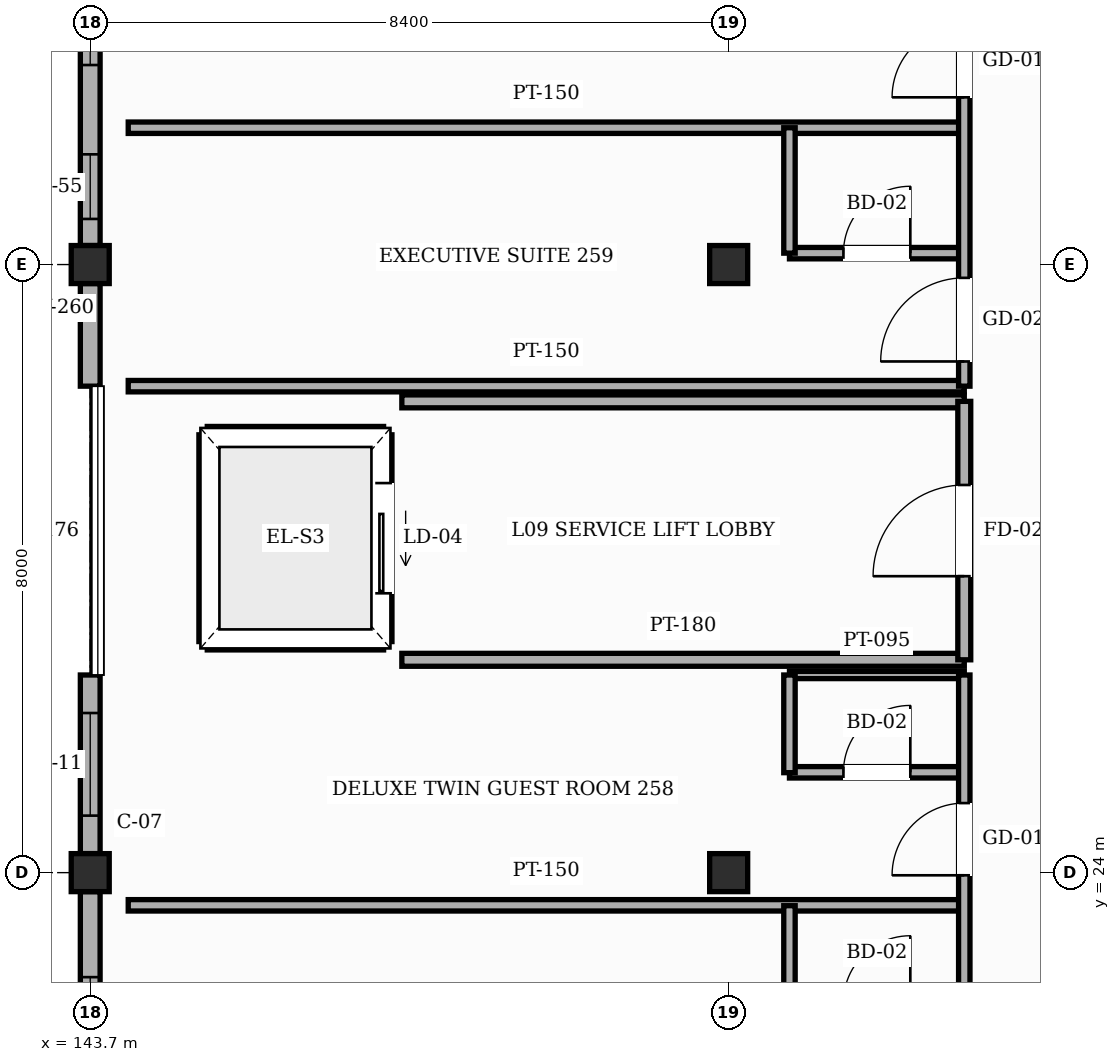
"""IFC4 building model, lengths in metres.
Left out: names, types, materials, properties, quantities, classifications, styles, units other than length and angle.
Written with IfcOpenShell. Run it as: python <this file> out.ifc"""

import sys

from ifc_helpers import new_model, si_unit, direction, frame, frame_2d, origin, origin_2d, place, context, subcontext, project, spatial, rectangle, hollow_rectangle, extrude, element, fill, save


model = new_model("IFC4")
c1 = context("Model", 3, precision=1e-05, world=origin(), true_north=direction((0.0, 1.0)))
c2 = subcontext(c1, "Body", "Model", "MODEL_VIEW")
j1 = project(units=[si_unit("LENGTHUNIT", "METRE"), si_unit("PLANEANGLEUNIT", "RADIAN")], contexts=[c1])
p1 = place(None, origin())
s1 = spatial("IfcSite", under=j1, at=p1, CompositionType="ELEMENT")
p2 = place(p1, origin())
s2 = spatial("IfcBuilding", under=s1, at=p2, CompositionType="ELEMENT")
p3 = place(p2, frame((0.0, 0.0, 39.0)))
s3 = spatial("IfcBuildingStorey", under=s2, at=p3, CompositionType="ELEMENT", Elevation=39.0)
for number, where, z_axis, x_axis in (
    (1, (143.7, 24.0, 0.0), (0.0, 0.0, 1.0), (1.0, 0.0, 0.0)),
    (2, (143.7, 32.0, 0.0), (0.0, 0.0, 1.0), (1.0, 0.0, 0.0)),
    (3, (152.1, 24.0, 0.0), (0.0, 0.0, 1.0), (1.0, 0.0, 0.0)),
    (4, (152.1, 32.0, 0.0), (0.0, 0.0, 1.0), (1.0, 0.0, 0.0)),
):
    element("IfcColumn", number, at=place(p3, frame(where, z_axis=z_axis, x_axis=x_axis)), inside=s3, PredefinedType="COLUMN", context=c2, shape_type="SweptSolid", body=[
        extrude(hollow_rectangle(XDim=0.5, YDim=0.5, WallThickness=0.022, InnerFilletRadius=0.022, OuterFilletRadius=0.044, at=origin_2d()), origin(), (0.0, 0.0, 1.0), 3.6),
    ])
p4 = place(p3, frame((143.7, 16.25, 0.0), z_axis=(0.0, 0.0, 1.0), x_axis=(0.0, 1.0, 0.0)))
e5 = element("IfcWall", 5, at=p4, inside=s3, PredefinedType="SOLIDWALL", context=c2, shape_type="SweptSolid", body=[
    extrude(rectangle(XDim=7.5, YDim=0.26, at=frame_2d((3.75, 0.0))), origin(), (0.0, 0.0, 1.0), 2.805),
])
p5 = place(p4, frame((1.715, 0.0, 0.85)))
e6 = element("IfcOpeningElement", 6, at=p5, cuts=e5, PredefinedType="OPENING", context=c2, shape_type="SweptSolid", body=[
    extrude(rectangle(XDim=2.1, YDim=1.35, at=frame_2d((1.05, 0.675))), frame((0.0, 0.14, 0.0), z_axis=(0.0, -1.0, 0.0), x_axis=(1.0, 0.0, 0.0)), (0.0, 0.0, 1.0), 0.28),
])
p6 = place(p4, frame((5.225, 0.0, 0.85)))
e7 = element("IfcOpeningElement", 7, at=p6, cuts=e5, PredefinedType="OPENING", context=c2, shape_type="SweptSolid", body=[
    extrude(rectangle(XDim=1.15, YDim=1.35, at=frame_2d((0.575, 0.675))), frame((0.0, 0.14, 0.0), z_axis=(0.0, -1.0, 0.0), x_axis=(1.0, 0.0, 0.0)), (0.0, 0.0, 1.0), 0.28),
])
p7 = place(p3, frame((143.7, 24.25, 0.0), z_axis=(0.0, 0.0, 1.0), x_axis=(0.0, 1.0, 0.0)))
e8 = element("IfcWall", 8, at=p7, inside=s3, PredefinedType="SOLIDWALL", context=c2, shape_type="SweptSolid", body=[
    extrude(rectangle(XDim=2.35, YDim=0.26, at=frame_2d((1.175, 0.0))), origin(), (0.0, 0.0, 1.0), 2.805),
])
p8 = place(p7, frame((0.5, 0.0, 0.85)))
e9 = element("IfcOpeningElement", 9, at=p8, cuts=e8, PredefinedType="OPENING", context=c2, shape_type="SweptSolid", body=[
    extrude(rectangle(XDim=1.35, YDim=1.35, at=frame_2d((0.675, 0.675))), frame((0.0, 0.14, 0.0), z_axis=(0.0, -1.0, 0.0), x_axis=(1.0, 0.0, 0.0)), (0.0, 0.0, 1.0), 0.28),
])
p9 = place(p3, frame((143.7, 30.4, 0.0), z_axis=(0.0, 0.0, 1.0), x_axis=(0.0, 1.0, 0.0)))
e10 = element("IfcWall", 10, at=p9, inside=s3, PredefinedType="SOLIDWALL", context=c2, shape_type="SweptSolid", body=[
    extrude(rectangle(XDim=1.35, YDim=0.26, at=frame_2d((0.675, 0.0))), origin(), (0.0, 0.0, 1.0), 2.805),
])
p10 = place(p3, frame((143.7, 32.25, 0.0), z_axis=(0.0, 0.0, 1.0), x_axis=(0.0, 1.0, 0.0)))
e11 = element("IfcWall", 11, at=p10, inside=s3, PredefinedType="SOLIDWALL", context=c2, shape_type="SweptSolid", body=[
    extrude(rectangle(XDim=8.4, YDim=0.26, at=frame_2d((4.2, 0.0))), origin(), (0.0, 0.0, 1.0), 2.655),
])
p11 = place(p10, frame((0.35, 0.0, 0.85)))
e12 = element("IfcOpeningElement", 12, at=p11, cuts=e11, PredefinedType="OPENING", context=c2, shape_type="SweptSolid", body=[
    extrude(rectangle(XDim=0.85, YDim=1.35, at=frame_2d((0.425, 0.675))), frame((0.0, 0.14, 0.0), z_axis=(0.0, -1.0, 0.0), x_axis=(1.0, 0.0, 0.0)), (0.0, 0.0, 1.0), 0.28),
])
p12 = place(p10, frame((2.375, 0.0, 0.85)))
e13 = element("IfcOpeningElement", 13, at=p12, cuts=e11, PredefinedType="OPENING", context=c2, shape_type="SweptSolid", body=[
    extrude(rectangle(XDim=1.75, YDim=1.35, at=frame_2d((0.875, 0.675))), frame((0.0, 0.14, 0.0), z_axis=(0.0, -1.0, 0.0), x_axis=(1.0, 0.0, 0.0)), (0.0, 0.0, 1.0), 0.28),
])
p13 = place(p10, frame((5.675, 0.0, 0.85)))
e14 = element("IfcOpeningElement", 14, at=p13, cuts=e11, PredefinedType="OPENING", context=c2, shape_type="SweptSolid", body=[
    extrude(rectangle(XDim=1.95, YDim=1.35, at=frame_2d((0.975, 0.675))), frame((0.0, 0.14, 0.0), z_axis=(0.0, -1.0, 0.0), x_axis=(1.0, 0.0, 0.0)), (0.0, 0.0, 1.0), 0.28),
])
for number, where, z_axis, x_axis in (
    (15, (145.24, 29.76, 0.0), (0.0, 0.0, 1.0), (1.0, 0.0, 0.0)),
    (16, (145.24, 27.04, 0.0), (0.0, 0.0, 1.0), (1.0, 0.0, 0.0)),
):
    element("IfcWall", number, at=place(p3, frame(where, z_axis=z_axis, x_axis=x_axis)), inside=s3, PredefinedType="SHEAR", context=c2, shape_type="SweptSolid", body=[
        extrude(rectangle(XDim=2.32, YDim=0.22, at=frame_2d((1.16, 0.0))), origin(), (0.0, 0.0, 1.0), 3.38),
    ])
p14 = place(p3, frame((147.56, 27.04, 0.0), z_axis=(0.0, 0.0, 1.0), x_axis=(0.0, 1.0, 0.0)))
e17 = element("IfcWall", 17, at=p14, inside=s3, PredefinedType="SHEAR", context=c2, shape_type="SweptSolid", body=[
    extrude(rectangle(XDim=2.72, YDim=0.22, at=frame_2d((1.36, 0.0))), origin(), (0.0, 0.0, 1.0), 3.38),
])
p15 = place(p14, frame((0.635, 0.0, 0.0)))
e18 = element("IfcOpeningElement", 18, at=p15, cuts=e17, PredefinedType="OPENING", context=c2, shape_type="SweptSolid", body=[
    extrude(rectangle(XDim=1.45, YDim=2.35, at=frame_2d((0.725, 1.175))), frame((0.0, 0.12, 0.0), z_axis=(0.0, -1.0, 0.0), x_axis=(1.0, 0.0, 0.0)), (0.0, 0.0, 1.0), 0.24),
])
p16 = place(p3, frame((145.24, 27.04, 0.0), z_axis=(0.0, 0.0, 1.0), x_axis=(0.0, 1.0, 0.0)))
e19 = element("IfcWall", 19, at=p16, inside=s3, PredefinedType="SHEAR", context=c2, shape_type="SweptSolid", body=[
    extrude(rectangle(XDim=2.72, YDim=0.22, at=frame_2d((1.36, 0.0))), origin(), (0.0, 0.0, 1.0), 3.38),
])
p17 = place(p3, frame((144.2, 23.57, 0.0), z_axis=(0.0, 0.0, 1.0), x_axis=(1.0, 0.0, 0.0)))
e20 = element("IfcWall", 20, at=p17, inside=s3, PredefinedType="PARTITIONING", context=c2, shape_type="SweptSolid", body=[
    extrude(rectangle(XDim=11.0, YDim=0.15, at=frame_2d((5.5, 0.0))), origin(), (0.0, 0.0, 1.0), 3.365),
])
p18 = place(p3, frame((152.9, 25.32, 0.0), z_axis=(0.0, 0.0, 1.0), x_axis=(1.0, 0.0, 0.0)))
e21 = element("IfcWall", 21, at=p18, inside=s3, PredefinedType="PARTITIONING", context=c2, shape_type="SweptSolid", body=[
    extrude(rectangle(XDim=2.3, YDim=0.15, at=frame_2d((1.15, 0.0))), origin(), (0.0, 0.0, 1.0), 3.365),
])
p19 = place(p18, frame((0.71, 0.0, 0.0)))
e22 = element("IfcOpeningElement", 22, at=p19, cuts=e21, PredefinedType="OPENING", context=c2, shape_type="SweptSolid", body=[
    extrude(rectangle(XDim=0.88, YDim=2.12, at=frame_2d((0.44, 1.06))), frame((0.0, 0.085, 0.0), z_axis=(0.0, -1.0, 0.0), x_axis=(1.0, 0.0, 0.0)), (0.0, 0.0, 1.0), 0.17),
])
p20 = place(p3, frame((152.9, 26.6, 0.0), z_axis=(0.0, 0.0, 1.0), x_axis=(1.0, 0.0, 0.0)))
e23 = element("IfcWall", 23, at=p20, inside=s3, PredefinedType="PARTITIONING", context=c2, shape_type="SweptSolid", body=[
    extrude(rectangle(XDim=2.3, YDim=0.095, at=frame_2d((1.15, 0.0))), origin(), (0.0, 0.0, 1.0), 3.365),
])
for number, where, z_axis, x_axis in (
    (24, (147.8, 26.8, 0.0), (0.0, 0.0, 1.0), (1.0, 0.0, 0.0)),
    (25, (147.8, 30.2, 0.0), (0.0, 0.0, 1.0), (1.0, 0.0, 0.0)),
):
    element("IfcWall", number, at=place(p3, frame(where, z_axis=z_axis, x_axis=x_axis)), inside=s3, PredefinedType="PARTITIONING", context=c2, shape_type="SweptSolid", body=[
        extrude(rectangle(XDim=7.4, YDim=0.17, at=frame_2d((3.7, 0.0))), origin(), (0.0, 0.0, 1.0), 3.365),
    ])
p21 = place(p3, frame((144.2, 30.4, 0.0), z_axis=(0.0, 0.0, 1.0), x_axis=(1.0, 0.0, 0.0)))
e26 = element("IfcWall", 26, at=p21, inside=s3, PredefinedType="PARTITIONING", context=c2, shape_type="SweptSolid", body=[
    extrude(rectangle(XDim=11.0, YDim=0.15, at=frame_2d((5.5, 0.0))), origin(), (0.0, 0.0, 1.0), 3.365),
])
p22 = place(p3, frame((152.9, 32.15, 0.0), z_axis=(0.0, 0.0, 1.0), x_axis=(1.0, 0.0, 0.0)))
e27 = element("IfcWall", 27, at=p22, inside=s3, PredefinedType="PARTITIONING", context=c2, shape_type="SweptSolid", body=[
    extrude(rectangle(XDim=2.3, YDim=0.15, at=frame_2d((1.15, 0.0))), origin(), (0.0, 0.0, 1.0), 2.755),
])
p23 = place(p22, frame((0.71, 0.0, 0.0)))
e28 = element("IfcOpeningElement", 28, at=p23, cuts=e27, PredefinedType="OPENING", context=c2, shape_type="SweptSolid", body=[
    extrude(rectangle(XDim=0.88, YDim=2.12, at=frame_2d((0.44, 1.06))), frame((0.0, 0.085, 0.0), z_axis=(0.0, -1.0, 0.0), x_axis=(1.0, 0.0, 0.0)), (0.0, 0.0, 1.0), 0.17),
])
p24 = place(p3, frame((144.2, 33.8, 0.0), z_axis=(0.0, 0.0, 1.0), x_axis=(1.0, 0.0, 0.0)))
e29 = element("IfcWall", 29, at=p24, inside=s3, PredefinedType="PARTITIONING", context=c2, shape_type="SweptSolid", body=[
    extrude(rectangle(XDim=11.0, YDim=0.15, at=frame_2d((5.5, 0.0))), origin(), (0.0, 0.0, 1.0), 3.365),
])
p25 = place(p3, frame((152.9, 22.285, 0.0), z_axis=(0.0, 0.0, 1.0), x_axis=(0.0, 1.0, 0.0)))
e30 = element("IfcWall", 30, at=p25, inside=s3, PredefinedType="PARTITIONING", context=c2, shape_type="SweptSolid", body=[
    extrude(rectangle(XDim=1.28, YDim=0.15, at=frame_2d((0.64, 0.0))), origin(), (0.0, 0.0, 1.0), 3.365),
])
p26 = place(p3, frame((152.9, 25.315, 0.0), z_axis=(0.0, 0.0, 1.0), x_axis=(0.0, 1.0, 0.0)))
e31 = element("IfcWall", 31, at=p26, inside=s3, PredefinedType="PARTITIONING", context=c2, shape_type="SweptSolid", body=[
    extrude(rectangle(XDim=1.285, YDim=0.15, at=frame_2d((0.643, 0.0))), origin(), (0.0, 0.0, 1.0), 3.365),
])
p27 = place(p3, frame((152.9, 32.15, 0.0), z_axis=(0.0, 0.0, 1.0), x_axis=(0.0, 1.0, 0.0)))
e32 = element("IfcWall", 32, at=p27, inside=s3, PredefinedType="PARTITIONING", context=c2, shape_type="SweptSolid", body=[
    extrude(rectangle(XDim=1.65, YDim=0.15, at=frame_2d((0.825, 0.0))), origin(), (0.0, 0.0, 1.0), 3.365),
])
p28 = place(p3, frame((155.2, 8.4, 0.0), z_axis=(0.0, 0.0, 1.0), x_axis=(0.0, 1.0, 0.0)))
e33 = element("IfcWall", 33, at=p28, inside=s3, PredefinedType="PARTITIONING", context=c2, shape_type="SweptSolid", body=[
    extrude(rectangle(XDim=18.2, YDim=0.15, at=frame_2d((9.1, 0.0))), origin(), (0.0, 0.0, 1.0), 3.365),
])
p29 = place(p28, frame((0.325, 0.0, 0.0)))
e34 = element("IfcOpeningElement", 34, at=p29, cuts=e33, PredefinedType="OPENING", context=c2, shape_type="SweptSolid", body=[
    extrude(rectangle(XDim=1.1, YDim=2.2, at=frame_2d((0.55, 1.1))), frame((0.0, 0.085, 0.0), z_axis=(0.0, -1.0, 0.0), x_axis=(1.0, 0.0, 0.0)), (0.0, 0.0, 1.0), 0.17),
])
p30 = place(p28, frame((3.435, 0.0, 0.0)))
e35 = element("IfcOpeningElement", 35, at=p30, cuts=e33, PredefinedType="OPENING", context=c2, shape_type="SweptSolid", body=[
    extrude(rectangle(XDim=0.95, YDim=2.15, at=frame_2d((0.475, 1.075))), frame((0.0, 0.085, 0.0), z_axis=(0.0, -1.0, 0.0), x_axis=(1.0, 0.0, 0.0)), (0.0, 0.0, 1.0), 0.17),
])
p31 = place(p28, frame((6.465, 0.0, 0.0)))
e36 = element("IfcOpeningElement", 36, at=p31, cuts=e33, PredefinedType="OPENING", context=c2, shape_type="SweptSolid", body=[
    extrude(rectangle(XDim=0.95, YDim=2.15, at=frame_2d((0.475, 1.075))), frame((0.0, 0.085, 0.0), z_axis=(0.0, -1.0, 0.0), x_axis=(1.0, 0.0, 0.0)), (0.0, 0.0, 1.0), 0.17),
])
p32 = place(p28, frame((9.5, 0.0, 0.0)))
e37 = element("IfcOpeningElement", 37, at=p32, cuts=e33, PredefinedType="OPENING", context=c2, shape_type="SweptSolid", body=[
    extrude(rectangle(XDim=0.95, YDim=2.15, at=frame_2d((0.475, 1.075))), frame((0.0, 0.085, 0.0), z_axis=(0.0, -1.0, 0.0), x_axis=(1.0, 0.0, 0.0)), (0.0, 0.0, 1.0), 0.17),
])
p33 = place(p28, frame((12.535, 0.0, 0.0)))
e38 = element("IfcOpeningElement", 38, at=p33, cuts=e33, PredefinedType="OPENING", context=c2, shape_type="SweptSolid", body=[
    extrude(rectangle(XDim=0.95, YDim=2.15, at=frame_2d((0.475, 1.075))), frame((0.0, 0.085, 0.0), z_axis=(0.0, -1.0, 0.0), x_axis=(1.0, 0.0, 0.0)), (0.0, 0.0, 1.0), 0.17),
])
p34 = place(p28, frame((15.565, 0.0, 0.0)))
e39 = element("IfcOpeningElement", 39, at=p34, cuts=e33, PredefinedType="OPENING", context=c2, shape_type="SweptSolid", body=[
    extrude(rectangle(XDim=0.95, YDim=2.15, at=frame_2d((0.475, 1.075))), frame((0.0, 0.085, 0.0), z_axis=(0.0, -1.0, 0.0), x_axis=(1.0, 0.0, 0.0)), (0.0, 0.0, 1.0), 0.17),
])
p35 = place(p3, frame((155.2, 26.8, 0.0), z_axis=(0.0, 0.0, 1.0), x_axis=(0.0, 1.0, 0.0)))
e40 = element("IfcWall", 40, at=p35, inside=s3, PredefinedType="PARTITIONING", context=c2, shape_type="SweptSolid", body=[
    extrude(rectangle(XDim=3.4, YDim=0.17, at=frame_2d((1.7, 0.0))), origin(), (0.0, 0.0, 1.0), 3.365),
])
p36 = place(p35, frame((1.1, 0.0, 0.0)))
e41 = element("IfcOpeningElement", 41, at=p36, cuts=e40, PredefinedType="OPENING", context=c2, shape_type="SweptSolid", body=[
    extrude(rectangle(XDim=1.2, YDim=2.2, at=frame_2d((0.6, 1.1))), frame((0.0, 0.095, 0.0), z_axis=(0.0, -1.0, 0.0), x_axis=(1.0, 0.0, 0.0)), (0.0, 0.0, 1.0), 0.19),
])
p37 = place(p3, frame((155.2, 30.4, 0.0), z_axis=(0.0, 0.0, 1.0), x_axis=(0.0, 1.0, 0.0)))
e42 = element("IfcWall", 42, at=p37, inside=s3, PredefinedType="PARTITIONING", context=c2, shape_type="SweptSolid", body=[
    extrude(rectangle(XDim=10.2, YDim=0.15, at=frame_2d((5.1, 0.0))), origin(), (0.0, 0.0, 1.0), 3.365),
])
p38 = place(p37, frame((0.325, 0.0, 0.0)))
e43 = element("IfcOpeningElement", 43, at=p38, cuts=e42, PredefinedType="OPENING", context=c2, shape_type="SweptSolid", body=[
    extrude(rectangle(XDim=1.1, YDim=2.2, at=frame_2d((0.55, 1.1))), frame((0.0, 0.085, 0.0), z_axis=(0.0, -1.0, 0.0), x_axis=(1.0, 0.0, 0.0)), (0.0, 0.0, 1.0), 0.17),
])
p39 = place(p37, frame((3.8, 0.0, 0.0)))
e44 = element("IfcOpeningElement", 44, at=p39, cuts=e42, PredefinedType="OPENING", context=c2, shape_type="SweptSolid", body=[
    extrude(rectangle(XDim=0.95, YDim=2.15, at=frame_2d((0.475, 1.075))), frame((0.0, 0.085, 0.0), z_axis=(0.0, -1.0, 0.0), x_axis=(1.0, 0.0, 0.0)), (0.0, 0.0, 1.0), 0.17),
])
p40 = place(p37, frame((7.2, 0.0, 0.0)))
e45 = element("IfcOpeningElement", 45, at=p40, cuts=e42, PredefinedType="OPENING", context=c2, shape_type="SweptSolid", body=[
    extrude(rectangle(XDim=0.95, YDim=2.15, at=frame_2d((0.475, 1.075))), frame((0.0, 0.085, 0.0), z_axis=(0.0, -1.0, 0.0), x_axis=(1.0, 0.0, 0.0)), (0.0, 0.0, 1.0), 0.17),
])
p41 = place(p6, origin())
e46 = element("IfcWindow", 46, at=p41, inside=s3, PartitioningType="SINGLE_PANEL", PredefinedType="WINDOW", context=c2, shape_type="SweptSolid", body=[
    extrude(rectangle(XDim=1.15, YDim=1.35, at=frame_2d((0.575, 0.675))), frame((0.0, 0.03, 0.0), z_axis=(0.0, -1.0, 0.0), x_axis=(1.0, 0.0, 0.0)), (0.0, 0.0, 1.0), 0.06),
])
fill(e7, e46)
p42 = place(p8, origin())
e47 = element("IfcWindow", 47, at=p42, inside=s3, PartitioningType="SINGLE_PANEL", PredefinedType="WINDOW", context=c2, shape_type="SweptSolid", body=[
    extrude(rectangle(XDim=1.35, YDim=1.35, at=frame_2d((0.675, 0.675))), frame((0.0, 0.03, 0.0), z_axis=(0.0, -1.0, 0.0), x_axis=(1.0, 0.0, 0.0)), (0.0, 0.0, 1.0), 0.06),
])
fill(e9, e47)
p43 = place(p11, origin())
e48 = element("IfcWindow", 48, at=p43, inside=s3, PartitioningType="SINGLE_PANEL", PredefinedType="WINDOW", context=c2, shape_type="SweptSolid", body=[
    extrude(rectangle(XDim=0.85, YDim=1.35, at=frame_2d((0.425, 0.675))), frame((0.0, 0.03, 0.0), z_axis=(0.0, -1.0, 0.0), x_axis=(1.0, 0.0, 0.0)), (0.0, 0.0, 1.0), 0.06),
])
fill(e12, e48)
p44 = place(p12, origin())
e49 = element("IfcWindow", 49, at=p44, inside=s3, PartitioningType="SINGLE_PANEL", PredefinedType="WINDOW", context=c2, shape_type="SweptSolid", body=[
    extrude(rectangle(XDim=1.75, YDim=1.35, at=frame_2d((0.875, 0.675))), frame((0.0, 0.03, 0.0), z_axis=(0.0, -1.0, 0.0), x_axis=(1.0, 0.0, 0.0)), (0.0, 0.0, 1.0), 0.06),
])
fill(e13, e49)
p45 = place(p15, origin())
e50 = element("IfcDoor", 50, at=p45, inside=s3, OperationType="SLIDING_TO_LEFT", PredefinedType="DOOR", context=c2, shape_type="SweptSolid", body=[
    extrude(rectangle(XDim=1.45, YDim=2.35, at=frame_2d((0.725, 1.175))), frame((0.0, 0.025, 0.0), z_axis=(0.0, -1.0, 0.0), x_axis=(1.0, 0.0, 0.0)), (0.0, 0.0, 1.0), 0.05),
])
fill(e18, e50)
p46 = place(p36, origin())
e51 = element("IfcDoor", 51, at=p46, inside=s3, OperationType="SINGLE_SWING_LEFT", PredefinedType="DOOR", context=c2, shape_type="SweptSolid", body=[
    extrude(rectangle(XDim=1.2, YDim=2.2, at=frame_2d((0.6, 1.1))), frame((0.0, 0.025, 0.0), z_axis=(0.0, -1.0, 0.0), x_axis=(1.0, 0.0, 0.0)), (0.0, 0.0, 1.0), 0.05),
])
fill(e41, e51)
p47 = place(p34, origin())
e52 = element("IfcDoor", 52, at=p47, inside=s3, OperationType="SINGLE_SWING_LEFT", PredefinedType="DOOR", context=c2, shape_type="SweptSolid", body=[
    extrude(rectangle(XDim=0.95, YDim=2.15, at=frame_2d((0.475, 1.075))), frame((0.0, 0.025, 0.0), z_axis=(0.0, -1.0, 0.0), x_axis=(1.0, 0.0, 0.0)), (0.0, 0.0, 1.0), 0.05),
])
fill(e39, e52)
p48 = place(p19, origin())
e53 = element("IfcDoor", 53, at=p48, inside=s3, OperationType="SINGLE_SWING_RIGHT", PredefinedType="DOOR", context=c2, shape_type="SweptSolid", body=[
    extrude(rectangle(XDim=0.88, YDim=2.12, at=frame_2d((0.44, 1.06))), frame((0.0, 0.025, 0.0), z_axis=(0.0, -1.0, 0.0), x_axis=(1.0, 0.0, 0.0)), (0.0, 0.0, 1.0), 0.05),
])
fill(e22, e53)
p49 = place(p38, origin())
e54 = element("IfcDoor", 54, at=p49, inside=s3, OperationType="SINGLE_SWING_LEFT", PredefinedType="DOOR", context=c2, shape_type="SweptSolid", body=[
    extrude(rectangle(XDim=1.1, YDim=2.2, at=frame_2d((0.55, 1.1))), frame((0.0, 0.025, 0.0), z_axis=(0.0, -1.0, 0.0), x_axis=(1.0, 0.0, 0.0)), (0.0, 0.0, 1.0), 0.05),
])
fill(e43, e54)
p50 = place(p23, origin())
e55 = element("IfcDoor", 55, at=p50, inside=s3, OperationType="SINGLE_SWING_RIGHT", PredefinedType="DOOR", context=c2, shape_type="SweptSolid", body=[
    extrude(rectangle(XDim=0.88, YDim=2.12, at=frame_2d((0.44, 1.06))), frame((0.0, 0.025, 0.0), z_axis=(0.0, -1.0, 0.0), x_axis=(1.0, 0.0, 0.0)), (0.0, 0.0, 1.0), 0.05),
])
fill(e28, e55)
p51 = place(p39, origin())
e56 = element("IfcDoor", 56, at=p51, inside=s3, OperationType="SINGLE_SWING_LEFT", PredefinedType="DOOR", context=c2, shape_type="SweptSolid", body=[
    extrude(rectangle(XDim=0.95, YDim=2.15, at=frame_2d((0.475, 1.075))), frame((0.0, 0.025, 0.0), z_axis=(0.0, -1.0, 0.0), x_axis=(1.0, 0.0, 0.0)), (0.0, 0.0, 1.0), 0.05),
])
fill(e44, e56)
save(model, sys.argv[1])
